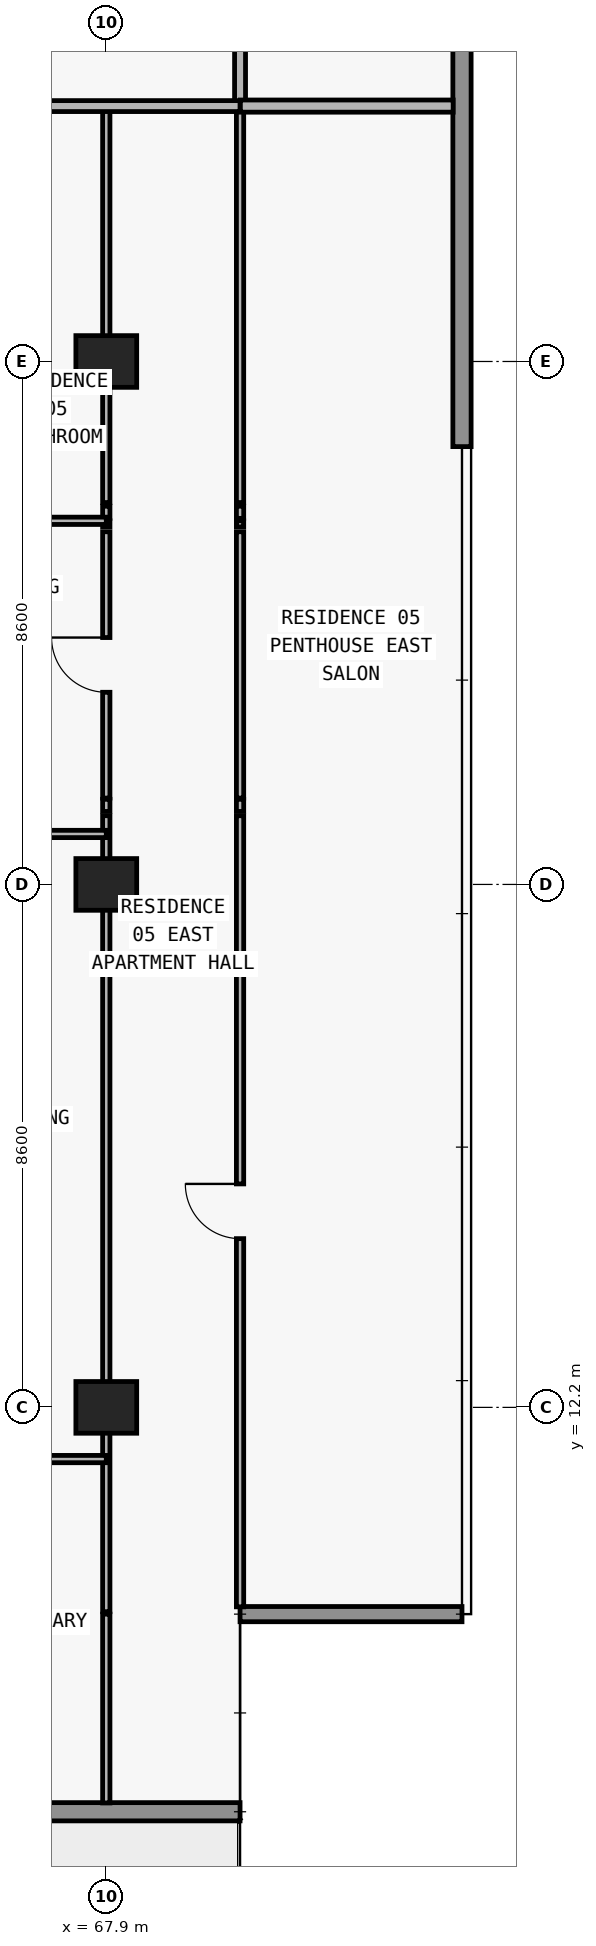
"""IFC4 building model, lengths in metres.
Left out: names, types, materials, properties, quantities, classifications, styles, units other than length and angle.
Written with IfcOpenShell. Run it as: python <this file> out.ifc"""

import sys

from ifc_helpers import new_model, si_unit, direction, frame, frame_2d, origin, origin_2d, place, context, subcontext, project, spatial, rectangle, extrude, element, fill, save


model = new_model("IFC4")
c1 = context("Model", 3, precision=1e-05, world=origin(), true_north=direction((0.0, 1.0)))
c2 = subcontext(c1, "Body", "Model", "MODEL_VIEW")
j1 = project(units=[si_unit("LENGTHUNIT", "METRE"), si_unit("PLANEANGLEUNIT", "RADIAN")], contexts=[c1])
p1 = place(None, origin())
s1 = spatial("IfcSite", under=j1, at=p1, CompositionType="ELEMENT")
p2 = place(p1, origin())
s2 = spatial("IfcBuilding", under=s1, at=p2, CompositionType="ELEMENT")
p3 = place(p2, frame((0.0, 0.0, 115.8)))
s3 = spatial("IfcBuildingStorey", under=s2, at=p3, CompositionType="ELEMENT", Elevation=115.8)
for number, where, z_axis, x_axis in (
    (1, (67.9, 12.2, 0.0), (0.0, 0.0, 1.0), (1.0, 0.0, 0.0)),
    (2, (67.9, 20.8, 0.0), (0.0, 0.0, 1.0), (1.0, 0.0, 0.0)),
    (3, (67.9, 29.4, 0.0), (0.0, 0.0, 1.0), (1.0, 0.0, 0.0)),
):
    element("IfcColumn", number, at=place(p3, frame(where, z_axis=z_axis, x_axis=x_axis)), inside=s3, PredefinedType="COLUMN", context=c2, shape_type="SweptSolid", body=[
        extrude(rectangle(XDim=1.0, YDim=0.85, at=origin_2d()), origin(), (0.0, 0.0, 1.0), 3.05),
    ])
p4 = place(p3, frame((70.1, 5.55, 0.0), z_axis=(0.0, 0.0, 1.0), x_axis=(-1.0, 0.0, 0.0)))
e4 = element("IfcWall", 4, at=p4, inside=s3, PredefinedType="STANDARD", context=c2, shape_type="SweptSolid", body=[
    extrude(rectangle(XDim=62.4, YDim=0.3, at=frame_2d((31.2, 0.0))), origin(), (0.0, 0.0, 1.0), 3.05),
])
p5 = place(p4, frame((57.29, 0.0, 0.0)))
e5 = element("IfcOpeningElement", 5, at=p5, cuts=e4, PredefinedType="OPENING", context=c2, shape_type="SweptSolid", body=[
    extrude(rectangle(XDim=2.0, YDim=2.3, at=frame_2d((1.0, 1.15))), frame((0.0, 0.16, 0.0), z_axis=(0.0, -1.0, 0.0), x_axis=(1.0, 0.0, 0.0)), (0.0, 0.0, 1.0), 0.32),
])
p6 = place(p4, frame((52.61, 0.0, 0.65)))
e6 = element("IfcOpeningElement", 6, at=p6, cuts=e4, PredefinedType="OPENING", context=c2, shape_type="SweptSolid", body=[
    extrude(rectangle(XDim=2.6, YDim=1.85, at=frame_2d((1.3, 0.925))), frame((0.0, 0.16, 0.0), z_axis=(0.0, -1.0, 0.0), x_axis=(1.0, 0.0, 0.0)), (0.0, 0.0, 1.0), 0.32),
])
p7 = place(p4, frame((46.5, 0.0, 0.85)))
e7 = element("IfcOpeningElement", 7, at=p7, cuts=e4, PredefinedType="OPENING", context=c2, shape_type="SweptSolid", body=[
    extrude(rectangle(XDim=2.2, YDim=1.55, at=frame_2d((1.1, 0.775))), frame((0.0, 0.16, 0.0), z_axis=(0.0, -1.0, 0.0), x_axis=(1.0, 0.0, 0.0)), (0.0, 0.0, 1.0), 0.32),
])
p8 = place(p4, frame((40.49, 0.0, 0.0)))
e8 = element("IfcOpeningElement", 8, at=p8, cuts=e4, PredefinedType="OPENING", context=c2, shape_type="SweptSolid", body=[
    extrude(rectangle(XDim=2.0, YDim=2.3, at=frame_2d((1.0, 1.15))), frame((0.0, 0.16, 0.0), z_axis=(0.0, -1.0, 0.0), x_axis=(1.0, 0.0, 0.0)), (0.0, 0.0, 1.0), 0.32),
])
p9 = place(p4, frame((35.81, 0.0, 0.65)))
e9 = element("IfcOpeningElement", 9, at=p9, cuts=e4, PredefinedType="OPENING", context=c2, shape_type="SweptSolid", body=[
    extrude(rectangle(XDim=2.6, YDim=1.85, at=frame_2d((1.3, 0.925))), frame((0.0, 0.16, 0.0), z_axis=(0.0, -1.0, 0.0), x_axis=(1.0, 0.0, 0.0)), (0.0, 0.0, 1.0), 0.32),
])
p10 = place(p4, frame((30.1, 0.0, 0.85)))
e10 = element("IfcOpeningElement", 10, at=p10, cuts=e4, PredefinedType="OPENING", context=c2, shape_type="SweptSolid", body=[
    extrude(rectangle(XDim=2.2, YDim=1.55, at=frame_2d((1.1, 0.775))), frame((0.0, 0.16, 0.0), z_axis=(0.0, -1.0, 0.0), x_axis=(1.0, 0.0, 0.0)), (0.0, 0.0, 1.0), 0.32),
])
p11 = place(p4, frame((24.426, 0.0, 0.0)))
e11 = element("IfcOpeningElement", 11, at=p11, cuts=e4, PredefinedType="OPENING", context=c2, shape_type="SweptSolid", body=[
    extrude(rectangle(XDim=2.0, YDim=2.3, at=frame_2d((1.0, 1.15))), frame((0.0, 0.16, 0.0), z_axis=(0.0, -1.0, 0.0), x_axis=(1.0, 0.0, 0.0)), (0.0, 0.0, 1.0), 0.32),
])
p12 = place(p4, frame((20.126, 0.0, 0.85)))
e12 = element("IfcOpeningElement", 12, at=p12, cuts=e4, PredefinedType="OPENING", context=c2, shape_type="SweptSolid", body=[
    extrude(rectangle(XDim=2.2, YDim=1.55, at=frame_2d((1.1, 0.775))), frame((0.0, 0.16, 0.0), z_axis=(0.0, -1.0, 0.0), x_axis=(1.0, 0.0, 0.0)), (0.0, 0.0, 1.0), 0.32),
])
p13 = place(p4, frame((15.69, 0.0, 0.0)))
e13 = element("IfcOpeningElement", 13, at=p13, cuts=e4, PredefinedType="OPENING", context=c2, shape_type="SweptSolid", body=[
    extrude(rectangle(XDim=2.0, YDim=2.3, at=frame_2d((1.0, 1.15))), frame((0.0, 0.16, 0.0), z_axis=(0.0, -1.0, 0.0), x_axis=(1.0, 0.0, 0.0)), (0.0, 0.0, 1.0), 0.32),
])
p14 = place(p4, frame((11.59, 0.0, 0.85)))
e14 = element("IfcOpeningElement", 14, at=p14, cuts=e4, PredefinedType="OPENING", context=c2, shape_type="SweptSolid", body=[
    extrude(rectangle(XDim=1.8, YDim=1.55, at=frame_2d((0.9, 0.775))), frame((0.0, 0.16, 0.0), z_axis=(0.0, -1.0, 0.0), x_axis=(1.0, 0.0, 0.0)), (0.0, 0.0, 1.0), 0.32),
])
p15 = place(p4, frame((7.626, 0.0, 0.0)))
e15 = element("IfcOpeningElement", 15, at=p15, cuts=e4, PredefinedType="OPENING", context=c2, shape_type="SweptSolid", body=[
    extrude(rectangle(XDim=2.0, YDim=2.3, at=frame_2d((1.0, 1.15))), frame((0.0, 0.16, 0.0), z_axis=(0.0, -1.0, 0.0), x_axis=(1.0, 0.0, 0.0)), (0.0, 0.0, 1.0), 0.32),
])
p16 = place(p4, frame((3.326, 0.0, 0.85)))
e16 = element("IfcOpeningElement", 16, at=p16, cuts=e4, PredefinedType="OPENING", context=c2, shape_type="SweptSolid", body=[
    extrude(rectangle(XDim=2.2, YDim=1.55, at=frame_2d((1.1, 0.775))), frame((0.0, 0.16, 0.0), z_axis=(0.0, -1.0, 0.0), x_axis=(1.0, 0.0, 0.0)), (0.0, 0.0, 1.0), 0.32),
])
p17 = place(p3, frame((70.1, 8.8, 0.0), z_axis=(0.0, 0.0, 1.0), x_axis=(1.0, 0.0, 0.0)))
e17 = element("IfcWall", 17, at=p17, inside=s3, PredefinedType="ELEMENTEDWALL", context=c2, shape_type="SweptSolid", body=[
    extrude(rectangle(XDim=3.65, YDim=0.25, at=frame_2d((1.825, 0.0))), origin(), (0.0, 0.0, 1.0), 3.05),
])
p18 = place(p3, frame((73.75, 47.2, 0.0), z_axis=(0.0, 0.0, 1.0), x_axis=(0.0, -1.0, 0.0)))
e18 = element("IfcWall", 18, at=p18, inside=s3, PredefinedType="STANDARD", context=c2, shape_type="SweptSolid", body=[
    extrude(rectangle(XDim=19.2, YDim=0.3, at=frame_2d((9.6, 0.0))), origin(), (0.0, 0.0, 1.0), 3.05),
])
p19 = place(p3, frame((67.9, 5.695, 0.0), z_axis=(0.0, 0.0, 1.0), x_axis=(0.0, 1.0, 0.0)))
e19 = element("IfcWall", 19, at=p19, inside=s3, PredefinedType="PARTITIONING", context=c2, shape_type="SweptSolid", body=[
    extrude(rectangle(XDim=3.105, YDim=0.12, at=frame_2d((1.552, 0.0))), origin(), (0.0, 0.0, 1.0), 3.05),
])
p20 = place(p3, frame((67.9, 8.84, 0.0), z_axis=(0.0, 0.0, 1.0), x_axis=(0.0, 1.0, 0.0)))
e20 = element("IfcWall", 20, at=p20, inside=s3, PredefinedType="PARTITIONING", context=c2, shape_type="SweptSolid", body=[
    extrude(rectangle(XDim=13.09, YDim=0.12, at=frame_2d((6.545, 0.0))), origin(), (0.0, 0.0, 1.0), 2.174),
])
p21 = place(p3, frame((67.9, 22.0, 0.0), z_axis=(0.0, 0.0, 1.0), x_axis=(0.0, 1.0, 0.0)))
e21 = element("IfcWall", 21, at=p21, inside=s3, PredefinedType="PARTITIONING", context=c2, shape_type="SweptSolid", body=[
    extrude(rectangle(XDim=0.2, YDim=0.12, at=frame_2d((0.1, 0.0))), origin(), (0.0, 0.0, 1.0), 2.174),
])
p22 = place(p3, frame((67.9, 22.22, 0.0), z_axis=(0.0, 0.0, 1.0), x_axis=(0.0, 1.0, 0.0)))
e22 = element("IfcWall", 22, at=p22, inside=s3, PredefinedType="PARTITIONING", context=c2, shape_type="SweptSolid", body=[
    extrude(rectangle(XDim=4.38, YDim=0.12, at=frame_2d((2.19, 0.0))), origin(), (0.0, 0.0, 1.0), 2.174),
])
p23 = place(p22, frame((1.74, 0.0, 0.0)))
e23 = element("IfcOpeningElement", 23, at=p23, cuts=e22, PredefinedType="OPENING", context=c2, shape_type="SweptSolid", body=[
    extrude(rectangle(XDim=0.9, YDim=2.124, at=frame_2d((0.45, 1.062))), frame((0.0, 0.07, 0.0), z_axis=(0.0, -1.0, 0.0), x_axis=(1.0, 0.0, 0.0)), (0.0, 0.0, 1.0), 0.14),
])
p24 = place(p3, frame((67.9, 26.68, 0.0), z_axis=(0.0, 0.0, 1.0), x_axis=(0.0, 1.0, 0.0)))
e24 = element("IfcWall", 24, at=p24, inside=s3, PredefinedType="PARTITIONING", context=c2, shape_type="SweptSolid", body=[
    extrude(rectangle(XDim=0.1, YDim=0.12, at=frame_2d((0.05, 0.0))), origin(), (0.0, 0.0, 1.0), 2.174),
])
p25 = place(p3, frame((67.9, 26.82, 0.0), z_axis=(0.0, 0.0, 1.0), x_axis=(0.0, 1.0, 0.0)))
e25 = element("IfcWall", 25, at=p25, inside=s3, PredefinedType="PARTITIONING", context=c2, shape_type="SweptSolid", body=[
    extrude(rectangle(XDim=0.2, YDim=0.12, at=frame_2d((0.1, 0.0))), origin(), (0.0, 0.0, 1.0), 2.174),
])
p26 = place(p3, frame((67.9, 27.08, 0.0), z_axis=(0.0, 0.0, 1.0), x_axis=(0.0, 1.0, 0.0)))
e26 = element("IfcWall", 26, at=p26, inside=s3, PredefinedType="PARTITIONING", context=c2, shape_type="SweptSolid", body=[
    extrude(rectangle(XDim=6.52, YDim=0.12, at=frame_2d((3.26, 0.0))), origin(), (0.0, 0.0, 1.0), 2.174),
])
p27 = place(p3, frame((70.1, 8.92, 0.0), z_axis=(0.0, 0.0, 1.0), x_axis=(0.0, 1.0, 0.0)))
e27 = element("IfcWall", 27, at=p27, inside=s3, PredefinedType="PARTITIONING", context=c2, shape_type="SweptSolid", body=[
    extrude(rectangle(XDim=13.01, YDim=0.12, at=frame_2d((6.505, 0.0))), origin(), (0.0, 0.0, 1.0), 3.05),
])
p28 = place(p27, frame((6.055, 0.0, 0.0)))
e28 = element("IfcOpeningElement", 28, at=p28, cuts=e27, PredefinedType="OPENING", context=c2, shape_type="SweptSolid", body=[
    extrude(rectangle(XDim=0.9, YDim=2.15, at=frame_2d((0.45, 1.075))), frame((0.0, 0.07, 0.0), z_axis=(0.0, -1.0, 0.0), x_axis=(1.0, 0.0, 0.0)), (0.0, 0.0, 1.0), 0.14),
])
p29 = place(p3, frame((70.1, 22.0, 0.0), z_axis=(0.0, 0.0, 1.0), x_axis=(0.0, 1.0, 0.0)))
e29 = element("IfcWall", 29, at=p29, inside=s3, PredefinedType="PARTITIONING", context=c2, shape_type="SweptSolid", body=[
    extrude(rectangle(XDim=0.2, YDim=0.12, at=frame_2d((0.1, 0.0))), origin(), (0.0, 0.0, 1.0), 3.05),
])
p30 = place(p3, frame((70.1, 22.22, 0.0), z_axis=(0.0, 0.0, 1.0), x_axis=(0.0, 1.0, 0.0)))
e30 = element("IfcWall", 30, at=p30, inside=s3, PredefinedType="PARTITIONING", context=c2, shape_type="SweptSolid", body=[
    extrude(rectangle(XDim=4.38, YDim=0.12, at=frame_2d((2.19, 0.0))), origin(), (0.0, 0.0, 1.0), 3.05),
])
p31 = place(p3, frame((70.1, 26.68, 0.0), z_axis=(0.0, 0.0, 1.0), x_axis=(0.0, 1.0, 0.0)))
e31 = element("IfcWall", 31, at=p31, inside=s3, PredefinedType="PARTITIONING", context=c2, shape_type="SweptSolid", body=[
    extrude(rectangle(XDim=0.1, YDim=0.12, at=frame_2d((0.05, 0.0))), origin(), (0.0, 0.0, 1.0), 3.05),
])
p32 = place(p3, frame((70.1, 26.82, 0.0), z_axis=(0.0, 0.0, 1.0), x_axis=(0.0, 1.0, 0.0)))
e32 = element("IfcWall", 32, at=p32, inside=s3, PredefinedType="PARTITIONING", context=c2, shape_type="SweptSolid", body=[
    extrude(rectangle(XDim=0.2, YDim=0.12, at=frame_2d((0.1, 0.0))), origin(), (0.0, 0.0, 1.0), 3.05),
])
p33 = place(p3, frame((70.1, 27.08, 0.0), z_axis=(0.0, 0.0, 1.0), x_axis=(0.0, 1.0, 0.0)))
e33 = element("IfcWall", 33, at=p33, inside=s3, PredefinedType="PARTITIONING", context=c2, shape_type="SweptSolid", body=[
    extrude(rectangle(XDim=6.52, YDim=0.12, at=frame_2d((3.26, 0.0))), origin(), (0.0, 0.0, 1.0), 3.05),
])
p34 = place(p3, frame((70.1, 33.605, 0.0), z_axis=(0.0, 0.0, 1.0), x_axis=(0.0, 1.0, 0.0)))
e34 = element("IfcWall", 34, at=p34, inside=s3, PredefinedType="PARTITIONING", context=c2, shape_type="SweptSolid", body=[
    extrude(rectangle(XDim=3.345, YDim=0.18, at=frame_2d((1.672, 0.0))), origin(), (0.0, 0.0, 1.0), 3.05),
])
p35 = place(p3, frame((63.448, 11.35, 0.0), z_axis=(0.0, 0.0, 1.0), x_axis=(1.0, 0.0, 0.0)))
e35 = element("IfcWall", 35, at=p35, inside=s3, PredefinedType="PARTITIONING", context=c2, shape_type="SweptSolid", body=[
    extrude(rectangle(XDim=4.452, YDim=0.12, at=frame_2d((2.226, 0.0))), origin(), (0.0, 0.0, 1.0), 3.05),
])
p36 = place(p35, frame((1.776, 0.0, 0.0)))
e36 = element("IfcOpeningElement", 36, at=p36, cuts=e35, PredefinedType="OPENING", context=c2, shape_type="SweptSolid", body=[
    extrude(rectangle(XDim=0.9, YDim=2.15, at=frame_2d((0.45, 1.075))), frame((0.0, 0.07, 0.0), z_axis=(0.0, -1.0, 0.0), x_axis=(1.0, 0.0, 0.0)), (0.0, 0.0, 1.0), 0.14),
])
p37 = place(p3, frame((59.55, 21.63, 0.0), z_axis=(0.0, 0.0, 1.0), x_axis=(1.0, 0.0, 0.0)))
e37 = element("IfcWall", 37, at=p37, inside=s3, PredefinedType="PARTITIONING", context=c2, shape_type="SweptSolid", body=[
    extrude(rectangle(XDim=8.35, YDim=0.12, at=frame_2d((4.175, 0.0))), origin(), (0.0, 0.0, 1.0), 3.05),
])
p38 = place(p37, frame((1.499, 0.0, 0.0)))
e38 = element("IfcOpeningElement", 38, at=p38, cuts=e37, PredefinedType="OPENING", context=c2, shape_type="SweptSolid", body=[
    extrude(rectangle(XDim=0.9, YDim=2.15, at=frame_2d((0.45, 1.075))), frame((0.0, 0.07, 0.0), z_axis=(0.0, -1.0, 0.0), x_axis=(1.0, 0.0, 0.0)), (0.0, 0.0, 1.0), 0.14),
])
p39 = place(p37, frame((6.093, 0.0, 0.0)))
e39 = element("IfcOpeningElement", 39, at=p39, cuts=e37, PredefinedType="OPENING", context=c2, shape_type="SweptSolid", body=[
    extrude(rectangle(XDim=0.9, YDim=2.15, at=frame_2d((0.45, 1.075))), frame((0.0, 0.07, 0.0), z_axis=(0.0, -1.0, 0.0), x_axis=(1.0, 0.0, 0.0)), (0.0, 0.0, 1.0), 0.14),
])
p40 = place(p3, frame((59.55, 26.78, 0.0), z_axis=(0.0, 0.0, 1.0), x_axis=(1.0, 0.0, 0.0)))
e40 = element("IfcWall", 40, at=p40, inside=s3, PredefinedType="PARTITIONING", context=c2, shape_type="SweptSolid", body=[
    extrude(rectangle(XDim=8.35, YDim=0.12, at=frame_2d((4.175, 0.0))), origin(), (0.0, 0.0, 1.0), 3.05),
])
p41 = place(p40, frame((1.918, 0.0, 0.0)))
e41 = element("IfcOpeningElement", 41, at=p41, cuts=e40, PredefinedType="OPENING", context=c2, shape_type="SweptSolid", body=[
    extrude(rectangle(XDim=0.9, YDim=2.15, at=frame_2d((0.45, 1.075))), frame((0.0, 0.07, 0.0), z_axis=(0.0, -1.0, 0.0), x_axis=(1.0, 0.0, 0.0)), (0.0, 0.0, 1.0), 0.14),
])
p42 = place(p3, frame((59.55, 33.6, 0.0), z_axis=(0.0, 0.0, 1.0), x_axis=(1.0, 0.0, 0.0)))
e42 = element("IfcWall", 42, at=p42, inside=s3, PredefinedType="PARTITIONING", context=c2, shape_type="SweptSolid", body=[
    extrude(rectangle(XDim=10.55, YDim=0.18, at=frame_2d((5.275, 0.0))), origin(), (0.0, 0.0, 1.0), 3.05),
])
p43 = place(p42, frame((2.85, 0.0, 0.0)))
e43 = element("IfcOpeningElement", 43, at=p43, cuts=e42, PredefinedType="OPENING", context=c2, shape_type="SweptSolid", body=[
    extrude(rectangle(XDim=1.0, YDim=2.2, at=frame_2d((0.5, 1.1))), frame((0.0, 0.1, 0.0), z_axis=(0.0, -1.0, 0.0), x_axis=(1.0, 0.0, 0.0)), (0.0, 0.0, 1.0), 0.2),
])
p44 = place(p3, frame((70.105, 33.6, 0.0), z_axis=(0.0, 0.0, 1.0), x_axis=(1.0, 0.0, 0.0)))
e44 = element("IfcWall", 44, at=p44, inside=s3, PredefinedType="PARTITIONING", context=c2, shape_type="SweptSolid", body=[
    extrude(rectangle(XDim=3.5, YDim=0.2, at=frame_2d((1.75, 0.0))), origin(), (0.0, 0.0, 1.0), 3.05),
])
p45 = place(p23, origin())
e45 = element("IfcDoor", 45, at=p45, inside=s3, OperationType="SINGLE_SWING_RIGHT", PredefinedType="DOOR", context=c2, shape_type="SweptSolid", body=[
    extrude(rectangle(XDim=0.9, YDim=2.124, at=frame_2d((0.45, 1.062))), frame((0.0, 0.025, 0.0), z_axis=(0.0, -1.0, 0.0), x_axis=(1.0, 0.0, 0.0)), (0.0, 0.0, 1.0), 0.05),
])
fill(e23, e45)
p46 = place(p28, origin())
e46 = element("IfcDoor", 46, at=p46, inside=s3, OperationType="SINGLE_SWING_RIGHT", PredefinedType="DOOR", context=c2, shape_type="SweptSolid", body=[
    extrude(rectangle(XDim=0.9, YDim=2.15, at=frame_2d((0.45, 1.075))), frame((0.0, 0.025, 0.0), z_axis=(0.0, -1.0, 0.0), x_axis=(1.0, 0.0, 0.0)), (0.0, 0.0, 1.0), 0.05),
])
fill(e28, e46)
save(model, sys.argv[1])
